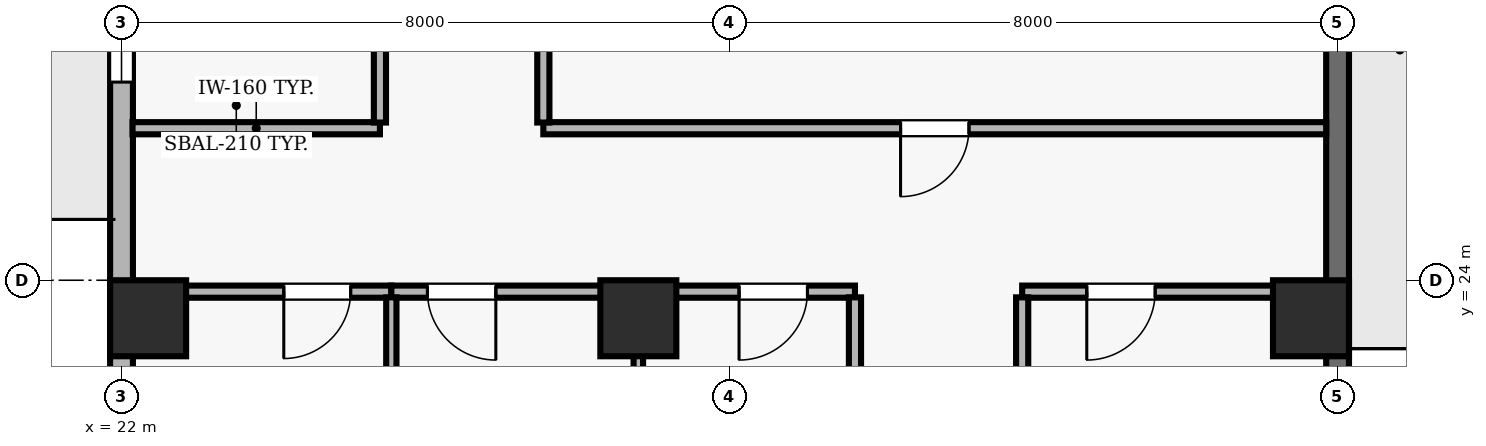
"""IFC4 building model, lengths in metres.
Left out: names, types, materials, properties, quantities, classifications, styles, units other than length and angle.
Written with IfcOpenShell. Run it as: python <this file> out.ifc"""

import sys

from ifc_helpers import new_model, si_unit, direction, frame, frame_2d, origin, origin_2d, place, context, subcontext, project, spatial, rectangle, extrude, element, fill, save


model = new_model("IFC4")
c1 = context("Model", 3, precision=1e-05, world=origin(), true_north=direction((0.0, 1.0)))
c2 = subcontext(c1, "Body", "Model", "MODEL_VIEW")
j1 = project(units=[si_unit("LENGTHUNIT", "METRE"), si_unit("PLANEANGLEUNIT", "RADIAN")], contexts=[c1])
p1 = place(None, origin())
s1 = spatial("IfcSite", under=j1, at=p1, CompositionType="ELEMENT")
p2 = place(p1, origin())
s2 = spatial("IfcBuilding", under=s1, at=p2, CompositionType="ELEMENT")
p3 = place(p2, frame((0.0, 0.0, 222.6)))
s3 = spatial("IfcBuildingStorey", under=s2, at=p3, CompositionType="ELEMENT", Elevation=222.6)
for number, where, z_axis, x_axis in (
    (1, (22.35, 23.5, 0.0), (0.0, 0.0, 1.0), (1.0, 0.0, 0.0)),
    (2, (28.8, 23.5, 0.0), (0.0, 0.0, 1.0), (1.0, 0.0, 0.0)),
    (3, (37.65, 23.5, 0.0), (0.0, 0.0, 1.0), (1.0, 0.0, 0.0)),
):
    element("IfcColumn", number, at=place(p3, frame(where, z_axis=z_axis, x_axis=x_axis)), inside=s3, PredefinedType="COLUMN", context=c2, shape_type="SweptSolid", body=[
        extrude(rectangle(XDim=1.0, YDim=1.0, at=origin_2d()), origin(), (0.0, 0.0, 1.0), 3.9),
    ])
p4 = place(p3, frame((38.0, 22.2, 0.0), z_axis=(0.0, 0.0, 1.0), x_axis=(0.0, 1.0, 0.0)))
e4 = element("IfcWall", 4, at=p4, inside=s3, PredefinedType="SOLIDWALL", context=c2, shape_type="SweptSolid", body=[
    extrude(rectangle(XDim=18.5, YDim=0.3, at=frame_2d((9.25, 0.0))), origin(), (0.0, 0.0, 1.0), 3.69),
])
p5 = place(p4, frame((9.95, 0.0, 0.0)))
e5 = element("IfcOpeningElement", 5, at=p5, cuts=e4, PredefinedType="OPENING", context=c2, shape_type="SweptSolid", body=[
    extrude(rectangle(XDim=1.0, YDim=2.2, at=frame_2d((0.5, 1.1))), frame((0.0, 0.16, 0.0), z_axis=(0.0, -1.0, 0.0), x_axis=(1.0, 0.0, 0.0)), (0.0, 0.0, 1.0), 0.32),
])
p6 = place(p4, frame((14.517, 0.0, 0.9)))
e6 = element("IfcOpeningElement", 6, at=p6, cuts=e4, PredefinedType="OPENING", context=c2, shape_type="SweptSolid", body=[
    extrude(rectangle(XDim=1.8, YDim=1.6, at=frame_2d((0.9, 0.8))), frame((0.0, 0.16, 0.0), z_axis=(0.0, -1.0, 0.0), x_axis=(1.0, 0.0, 0.0)), (0.0, 0.0, 1.0), 0.32),
])
p7 = place(p3, frame((22.0, 40.7, 0.0), z_axis=(0.0, 0.0, 1.0), x_axis=(0.0, -1.0, 0.0)))
e7 = element("IfcWall", 7, at=p7, inside=s3, PredefinedType="SOLIDWALL", context=c2, shape_type="SweptSolid", body=[
    extrude(rectangle(XDim=38.2, YDim=0.3, at=frame_2d((19.1, 0.0))), origin(), (0.0, 0.0, 1.0), 3.69),
])
p8 = place(p7, frame((7.8, 0.0, 0.0)))
e8 = element("IfcOpeningElement", 8, at=p8, cuts=e7, PredefinedType="OPENING", context=c2, shape_type="SweptSolid", body=[
    extrude(rectangle(XDim=1.0, YDim=2.2, at=frame_2d((0.5, 1.1))), frame((0.0, 0.16, 0.0), z_axis=(0.0, -1.0, 0.0), x_axis=(1.0, 0.0, 0.0)), (0.0, 0.0, 1.0), 0.32),
])
p9 = place(p7, frame((2.279, 0.0, 0.9)))
e9 = element("IfcOpeningElement", 9, at=p9, cuts=e7, PredefinedType="OPENING", context=c2, shape_type="SweptSolid", body=[
    extrude(rectangle(XDim=1.8, YDim=1.8, at=frame_2d((0.9, 0.9))), frame((0.0, 0.16, 0.0), z_axis=(0.0, -1.0, 0.0), x_axis=(1.0, 0.0, 0.0)), (0.0, 0.0, 1.0), 0.32),
])
p10 = place(p7, frame((12.293, 0.0, 0.9)))
e10 = element("IfcOpeningElement", 10, at=p10, cuts=e7, PredefinedType="OPENING", context=c2, shape_type="SweptSolid", body=[
    extrude(rectangle(XDim=1.8, YDim=1.8, at=frame_2d((0.9, 0.9))), frame((0.0, 0.16, 0.0), z_axis=(0.0, -1.0, 0.0), x_axis=(1.0, 0.0, 0.0)), (0.0, 0.0, 1.0), 0.32),
])
p11 = place(p7, frame((18.2, 0.0, 0.9)))
e11 = element("IfcOpeningElement", 11, at=p11, cuts=e7, PredefinedType="OPENING", context=c2, shape_type="SweptSolid", body=[
    extrude(rectangle(XDim=1.8, YDim=1.8, at=frame_2d((0.9, 0.9))), frame((0.0, 0.16, 0.0), z_axis=(0.0, -1.0, 0.0), x_axis=(1.0, 0.0, 0.0)), (0.0, 0.0, 1.0), 0.32),
])
p12 = place(p7, frame((23.207, 0.0, 0.9)))
e12 = element("IfcOpeningElement", 12, at=p12, cuts=e7, PredefinedType="OPENING", context=c2, shape_type="SweptSolid", body=[
    extrude(rectangle(XDim=1.8, YDim=1.8, at=frame_2d((0.9, 0.9))), frame((0.0, 0.16, 0.0), z_axis=(0.0, -1.0, 0.0), x_axis=(1.0, 0.0, 0.0)), (0.0, 0.0, 1.0), 0.32),
])
p13 = place(p7, frame((29.114, 0.0, 0.9)))
e13 = element("IfcOpeningElement", 13, at=p13, cuts=e7, PredefinedType="OPENING", context=c2, shape_type="SweptSolid", body=[
    extrude(rectangle(XDim=1.8, YDim=1.8, at=frame_2d((0.9, 0.9))), frame((0.0, 0.16, 0.0), z_axis=(0.0, -1.0, 0.0), x_axis=(1.0, 0.0, 0.0)), (0.0, 0.0, 1.0), 0.32),
])
p14 = place(p3, frame((25.4, 26.0, 0.0), z_axis=(0.0, 0.0, 1.0), x_axis=(-1.0, 0.0, 0.0)))
e14 = element("IfcWall", 14, at=p14, inside=s3, PredefinedType="PARTITIONING", context=c2, shape_type="SweptSolid", body=[
    extrude(rectangle(XDim=3.255, YDim=0.16, at=frame_2d((1.627, 0.0))), origin(), (0.0, 0.0, 1.0), 3.69),
])
p15 = place(p3, frame((25.55, 23.85, 0.0), z_axis=(0.0, 0.0, 1.0), x_axis=(-1.0, 0.0, 0.0)))
e15 = element("IfcWall", 15, at=p15, inside=s3, PredefinedType="PARTITIONING", context=c2, shape_type="SweptSolid", body=[
    extrude(rectangle(XDim=3.35, YDim=0.16, at=frame_2d((1.675, 0.0))), origin(), (0.0, 0.0, 1.0), 3.139),
])
p16 = place(p15, frame((0.535, 0.0, 0.0)))
e16 = element("IfcOpeningElement", 16, at=p16, cuts=e15, PredefinedType="OPENING", context=c2, shape_type="SweptSolid", body=[
    extrude(rectangle(XDim=0.88, YDim=2.1, at=frame_2d((0.44, 1.05))), frame((0.0, 0.09, 0.0), z_axis=(0.0, -1.0, 0.0), x_axis=(1.0, 0.0, 0.0)), (0.0, 0.0, 1.0), 0.18),
])
p17 = place(p3, frame((28.8, 23.85, 0.0), z_axis=(0.0, 0.0, 1.0), x_axis=(-1.0, 0.0, 0.0)))
e17 = element("IfcWall", 17, at=p17, inside=s3, PredefinedType="PARTITIONING", context=c2, shape_type="SweptSolid", body=[
    extrude(rectangle(XDim=3.25, YDim=0.16, at=frame_2d((1.625, 0.0))), origin(), (0.0, 0.0, 1.0), 3.139),
])
p18 = place(p17, frame((1.875, 0.0, 0.0)))
e18 = element("IfcOpeningElement", 18, at=p18, cuts=e17, PredefinedType="OPENING", context=c2, shape_type="SweptSolid", body=[
    extrude(rectangle(XDim=0.9, YDim=2.1, at=frame_2d((0.45, 1.05))), frame((0.0, 0.09, 0.0), z_axis=(0.0, -1.0, 0.0), x_axis=(1.0, 0.0, 0.0)), (0.0, 0.0, 1.0), 0.18),
])
p19 = place(p3, frame((31.65, 23.85, 0.0), z_axis=(0.0, 0.0, 1.0), x_axis=(-1.0, 0.0, 0.0)))
e19 = element("IfcWall", 19, at=p19, inside=s3, PredefinedType="PARTITIONING", context=c2, shape_type="SweptSolid", body=[
    extrude(rectangle(XDim=2.85, YDim=0.16, at=frame_2d((1.425, 0.0))), origin(), (0.0, 0.0, 1.0), 3.139),
])
p20 = place(p19, frame((0.625, 0.0, 0.0)))
e20 = element("IfcOpeningElement", 20, at=p20, cuts=e19, PredefinedType="OPENING", context=c2, shape_type="SweptSolid", body=[
    extrude(rectangle(XDim=0.9, YDim=2.1, at=frame_2d((0.45, 1.05))), frame((0.0, 0.09, 0.0), z_axis=(0.0, -1.0, 0.0), x_axis=(1.0, 0.0, 0.0)), (0.0, 0.0, 1.0), 0.18),
])
p21 = place(p3, frame((37.85, 23.85, 0.0), z_axis=(0.0, 0.0, 1.0), x_axis=(-1.0, 0.0, 0.0)))
e21 = element("IfcWall", 21, at=p21, inside=s3, PredefinedType="PARTITIONING", context=c2, shape_type="SweptSolid", body=[
    extrude(rectangle(XDim=4.0, YDim=0.16, at=frame_2d((2.0, 0.0))), origin(), (0.0, 0.0, 1.0), 3.139),
])
p22 = place(p21, frame((2.25, 0.0, 0.0)))
e22 = element("IfcOpeningElement", 22, at=p22, cuts=e21, PredefinedType="OPENING", context=c2, shape_type="SweptSolid", body=[
    extrude(rectangle(XDim=0.9, YDim=2.1, at=frame_2d((0.45, 1.05))), frame((0.0, 0.09, 0.0), z_axis=(0.0, -1.0, 0.0), x_axis=(1.0, 0.0, 0.0)), (0.0, 0.0, 1.0), 0.18),
])
p23 = place(p3, frame((37.85, 26.0, 0.0), z_axis=(0.0, 0.0, 1.0), x_axis=(-1.0, 0.0, 0.0)))
e23 = element("IfcWall", 23, at=p23, inside=s3, PredefinedType="PARTITIONING", context=c2, shape_type="SweptSolid", body=[
    extrude(rectangle(XDim=10.3, YDim=0.16, at=frame_2d((5.15, 0.0))), origin(), (0.0, 0.0, 1.0), 3.69),
])
p24 = place(p23, frame((4.7, 0.0, 0.0)))
e24 = element("IfcOpeningElement", 24, at=p24, cuts=e23, PredefinedType="OPENING", context=c2, shape_type="SweptSolid", body=[
    extrude(rectangle(XDim=0.9, YDim=2.1, at=frame_2d((0.45, 1.05))), frame((0.0, 0.09, 0.0), z_axis=(0.0, -1.0, 0.0), x_axis=(1.0, 0.0, 0.0)), (0.0, 0.0, 1.0), 0.18),
])
p25 = place(p3, frame((25.4, 29.915, 0.0), z_axis=(0.0, 0.0, 1.0), x_axis=(0.0, -1.0, 0.0)))
e25 = element("IfcWall", 25, at=p25, inside=s3, PredefinedType="PARTITIONING", context=c2, shape_type="SweptSolid", body=[
    extrude(rectangle(XDim=3.84, YDim=0.16, at=frame_2d((1.92, 0.0))), origin(), (0.0, 0.0, 1.0), 3.69),
])
p26 = place(p25, frame((1.47, 0.0, 0.0)))
e26 = element("IfcOpeningElement", 26, at=p26, cuts=e25, PredefinedType="OPENING", context=c2, shape_type="SweptSolid", body=[
    extrude(rectangle(XDim=0.9, YDim=2.1, at=frame_2d((0.45, 1.05))), frame((0.0, 0.09, 0.0), z_axis=(0.0, -1.0, 0.0), x_axis=(1.0, 0.0, 0.0)), (0.0, 0.0, 1.0), 0.18),
])
p27 = place(p3, frame((25.55, 19.16, 0.0), z_axis=(0.0, 0.0, 1.0), x_axis=(0.0, 1.0, 0.0)))
e27 = element("IfcWall", 27, at=p27, inside=s3, PredefinedType="PARTITIONING", context=c2, shape_type="SweptSolid", body=[
    extrude(rectangle(XDim=4.615, YDim=0.135, at=frame_2d((2.308, 0.0))), origin(), (0.0, 0.0, 1.0), 3.69),
])
p28 = place(p3, frame((27.55, 26.075, 0.0), z_axis=(0.0, 0.0, 1.0), x_axis=(0.0, 1.0, 0.0)))
e28 = element("IfcWall", 28, at=p28, inside=s3, PredefinedType="PARTITIONING", context=c2, shape_type="SweptSolid", body=[
    extrude(rectangle(XDim=3.858, YDim=0.16, at=frame_2d((1.929, 0.0))), origin(), (0.0, 0.0, 1.0), 3.69),
])
p29 = place(p3, frame((28.8, 23.775, 0.0), z_axis=(0.0, 0.0, 1.0), x_axis=(0.0, -1.0, 0.0)))
e29 = element("IfcWall", 29, at=p29, inside=s3, PredefinedType="PARTITIONING", context=c2, shape_type="SweptSolid", body=[
    extrude(rectangle(XDim=2.267, YDim=0.125, at=frame_2d((1.133, 0.0))), origin(), (0.0, 0.0, 1.0), 3.69),
])
p30 = place(p3, frame((31.65, 23.775, 0.0), z_axis=(0.0, 0.0, 1.0), x_axis=(0.0, -1.0, 0.0)))
e30 = element("IfcWall", 30, at=p30, inside=s3, PredefinedType="PARTITIONING", context=c2, shape_type="SweptSolid", body=[
    extrude(rectangle(XDim=2.267, YDim=0.16, at=frame_2d((1.133, 0.0))), origin(), (0.0, 0.0, 1.0), 3.69),
])
p31 = place(p3, frame((33.85, 20.835, 0.0), z_axis=(0.0, 0.0, 1.0), x_axis=(0.0, 1.0, 0.0)))
e31 = element("IfcWall", 31, at=p31, inside=s3, PredefinedType="PARTITIONING", context=c2, shape_type="SweptSolid", body=[
    extrude(rectangle(XDim=2.94, YDim=0.16, at=frame_2d((1.47, 0.0))), origin(), (0.0, 0.0, 1.0), 3.69),
])
p32 = place(p10, origin())
e32 = element("IfcWindow", 32, at=p32, inside=s3, PartitioningType="SINGLE_PANEL", PredefinedType="WINDOW", context=c2, shape_type="SweptSolid", body=[
    extrude(rectangle(XDim=1.8, YDim=1.8, at=frame_2d((0.9, 0.9))), frame((0.0, 0.03, 0.0), z_axis=(0.0, -1.0, 0.0), x_axis=(1.0, 0.0, 0.0)), (0.0, 0.0, 1.0), 0.06),
])
fill(e10, e32)
p33 = place(p22, origin())
e33 = element("IfcDoor", 33, at=p33, inside=s3, OperationType="SINGLE_SWING_RIGHT", PredefinedType="DOOR", context=c2, shape_type="SweptSolid", body=[
    extrude(rectangle(XDim=0.9, YDim=2.1, at=frame_2d((0.45, 1.05))), frame((0.0, 0.025, 0.0), z_axis=(0.0, -1.0, 0.0), x_axis=(1.0, 0.0, 0.0)), (0.0, 0.0, 1.0), 0.05),
])
fill(e22, e33)
p34 = place(p20, origin())
e34 = element("IfcDoor", 34, at=p34, inside=s3, OperationType="SINGLE_SWING_RIGHT", PredefinedType="DOOR", context=c2, shape_type="SweptSolid", body=[
    extrude(rectangle(XDim=0.9, YDim=2.1, at=frame_2d((0.45, 1.05))), frame((0.0, 0.025, 0.0), z_axis=(0.0, -1.0, 0.0), x_axis=(1.0, 0.0, 0.0)), (0.0, 0.0, 1.0), 0.05),
])
fill(e20, e34)
p35 = place(p16, origin())
e35 = element("IfcDoor", 35, at=p35, inside=s3, OperationType="SINGLE_SWING_RIGHT", PredefinedType="DOOR", context=c2, shape_type="SweptSolid", body=[
    extrude(rectangle(XDim=0.88, YDim=2.1, at=frame_2d((0.44, 1.05))), frame((0.0, 0.025, 0.0), z_axis=(0.0, -1.0, 0.0), x_axis=(1.0, 0.0, 0.0)), (0.0, 0.0, 1.0), 0.05),
])
fill(e16, e35)
p36 = place(p18, origin())
e36 = element("IfcDoor", 36, at=p36, inside=s3, OperationType="SINGLE_SWING_LEFT", PredefinedType="DOOR", context=c2, shape_type="SweptSolid", body=[
    extrude(rectangle(XDim=0.9, YDim=2.1, at=frame_2d((0.45, 1.05))), frame((0.0, 0.025, 0.0), z_axis=(0.0, -1.0, 0.0), x_axis=(1.0, 0.0, 0.0)), (0.0, 0.0, 1.0), 0.05),
])
fill(e18, e36)
p37 = place(p24, origin())
e37 = element("IfcDoor", 37, at=p37, inside=s3, OperationType="SINGLE_SWING_RIGHT", PredefinedType="DOOR", context=c2, shape_type="SweptSolid", body=[
    extrude(rectangle(XDim=0.9, YDim=2.1, at=frame_2d((0.45, 1.05))), frame((0.0, 0.025, 0.0), z_axis=(0.0, -1.0, 0.0), x_axis=(1.0, 0.0, 0.0)), (0.0, 0.0, 1.0), 0.05),
])
fill(e24, e37)
save(model, sys.argv[1])
